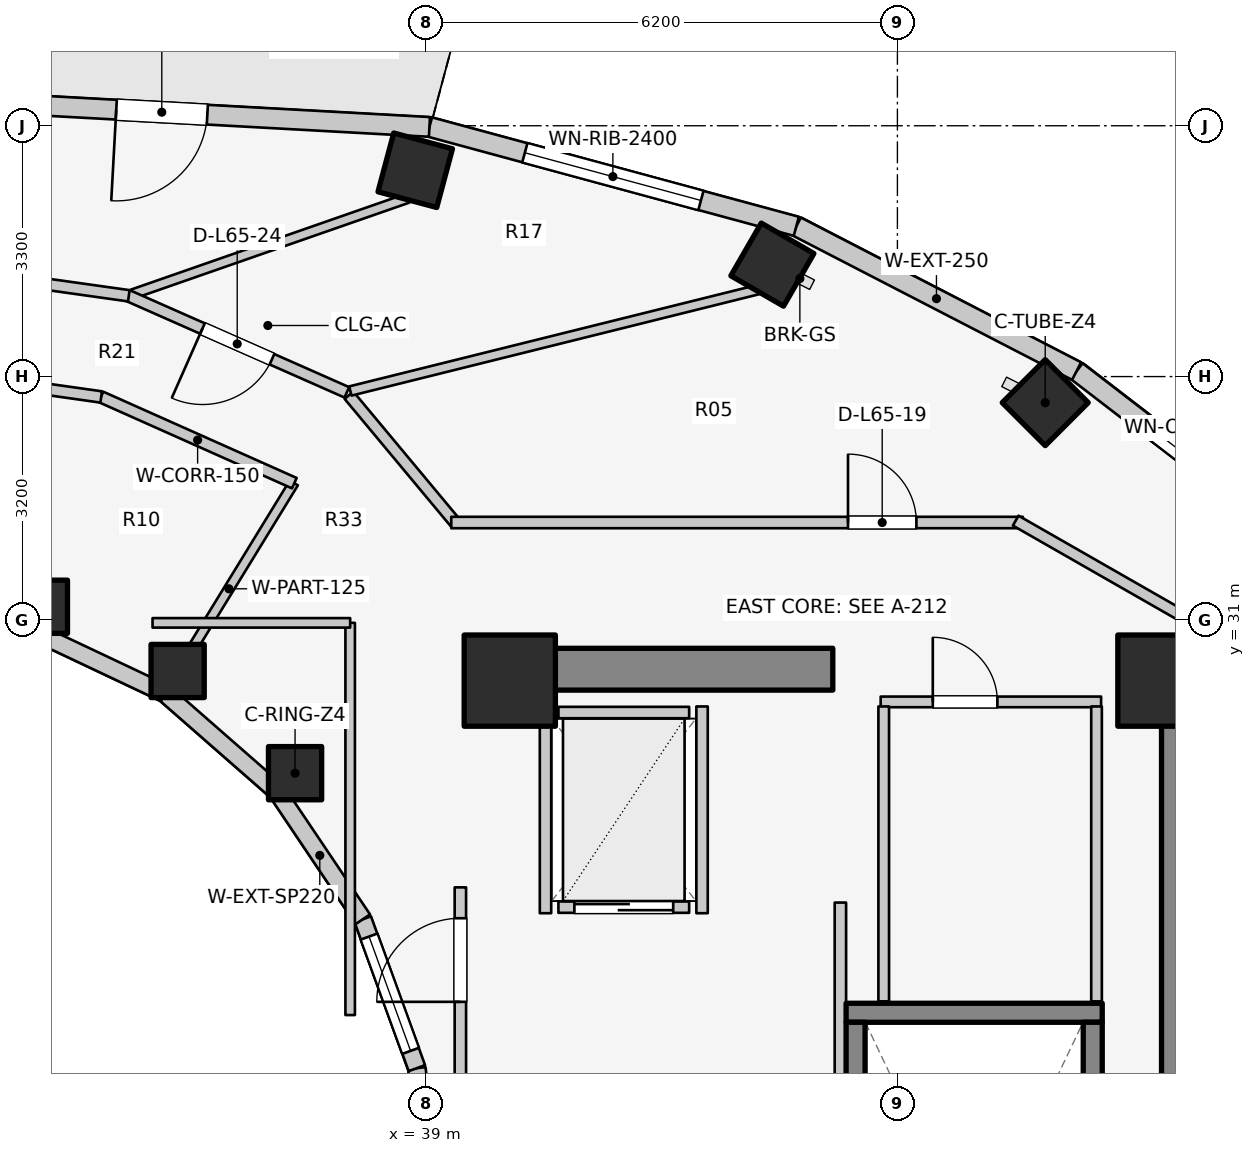
"""IFC4 building model, lengths in metres.
Left out: names, types, materials, properties, quantities, classifications, styles, units other than length and angle.
Written with IfcOpenShell. Run it as: python <this file> out.ifc"""

import sys

from ifc_helpers import new_model, si_unit, direction, frame, frame_2d, origin, origin_2d, place, context, subcontext, project, spatial, rectangle, extrude, element, fill, save


model = new_model("IFC4")
c1 = context("Model", 3, precision=1e-05, world=origin(), true_north=direction((0.0, 1.0)))
c2 = subcontext(c1, "Body", "Model", "MODEL_VIEW")
j1 = project(units=[si_unit("LENGTHUNIT", "METRE"), si_unit("PLANEANGLEUNIT", "RADIAN")], contexts=[c1])
p1 = place(None, origin())
s1 = spatial("IfcSite", under=j1, at=p1, CompositionType="ELEMENT")
p2 = place(p1, origin())
s2 = spatial("IfcBuilding", under=s1, at=p2, CompositionType="ELEMENT")
p3 = place(p2, frame((0.0, 0.0, 214.0)))
s3 = spatial("IfcBuildingStorey", under=s2, at=p3, CompositionType="ELEMENT", Elevation=214.0)
p4 = place(p3, frame((48.95, 17.05, 0.0), z_axis=(0.0, 0.0, 1.0), x_axis=(0.0, 1.0, 0.0)))
e1 = element("IfcWall", 1, at=p4, inside=s3, PredefinedType="SHEAR", context=c2, shape_type="SweptSolid", body=[
    extrude(rectangle(XDim=12.8, YDim=0.55, at=frame_2d((6.4, 0.0))), origin(), (0.0, 0.0, 1.0), 3.1),
])
p5 = place(p3, frame((39.85, 30.35, 0.0), z_axis=(0.0, 0.0, 1.0), x_axis=(1.0, 0.0, 0.0)))
e2 = element("IfcWall", 2, at=p5, inside=s3, PredefinedType="SHEAR", context=c2, shape_type="SweptSolid", body=[
    extrude(rectangle(XDim=4.5, YDim=0.55, at=frame_2d((2.25, 0.0))), origin(), (0.0, 0.0, 1.0), 3.1),
])
p6 = place(p3, frame((44.525, 25.83, 0.0), z_axis=(0.0, 0.0, 1.0), x_axis=(1.0, 0.0, 0.0)))
e3 = element("IfcWall", 3, at=p6, inside=s3, PredefinedType="SOLIDWALL", context=c2, shape_type="SweptSolid", body=[
    extrude(rectangle(XDim=3.37, YDim=0.25, at=frame_2d((1.685, 0.0))), origin(), (0.0, 0.0, 1.0), 3.1),
])
for number, where, z_axis, x_axis in (
    (4, (44.65, 17.895, 0.0), (0.0, 0.0, 1.0), (0.0, 1.0, 0.0)),
    (5, (47.77, 17.895, 0.0), (0.0, 0.0, 1.0), (0.0, 1.0, 0.0)),
):
    element("IfcWall", number, at=place(p3, frame(where, z_axis=z_axis, x_axis=x_axis)), inside=s3, PredefinedType="SOLIDWALL", context=c2, shape_type="SweptSolid", body=[
        extrude(rectangle(XDim=7.81, YDim=0.25, at=frame_2d((3.905, 0.0))), origin(), (0.0, 0.0, 1.0), 3.1),
    ])
for number, where, z_axis, x_axis in (
    (6, (48.7, 30.2, 0.0), (0.0, 0.0, 1.0), (1.0, 0.0, 0.0)),
    (7, (40.1, 30.2, 0.0), (0.0, 0.0, 1.0), (1.0, 0.0, 0.0)),
):
    element("IfcColumn", number, at=place(p3, frame(where, z_axis=z_axis, x_axis=x_axis)), inside=s3, PredefinedType="COLUMN", context=c2, shape_type="SweptSolid", body=[
        extrude(rectangle(XDim=1.2, YDim=1.2, at=origin_2d()), origin(), (0.0, 0.0, 1.0), 3.1),
    ])
p7 = place(p3, frame((37.275, 28.982, 0.0), z_axis=(0.0, 0.0, 1.0), x_axis=(1.0, 0.0, 0.0)))
e8 = element("IfcColumn", 8, at=p7, inside=s3, PredefinedType="COLUMN", context=c2, shape_type="SweptSolid", body=[
    extrude(rectangle(XDim=0.7, YDim=0.7, at=origin_2d()), origin(), (0.0, 0.0, 1.0), 3.1),
])
p8 = place(p3, frame((47.145, 33.857, 0.0), z_axis=(0.0, 0.0, 1.0), x_axis=(0.707106781187, 0.707106781187, 0.0)))
e9 = element("IfcColumn", 9, at=p8, inside=s3, PredefinedType="COLUMN", context=c2, shape_type="SweptSolid", body=[
    extrude(rectangle(XDim=0.8, YDim=0.8, at=origin_2d()), origin(), (0.0, 0.0, 1.0), 3.1),
])
p9 = place(p3, frame((35.73, 30.327, 0.0), z_axis=(0.0, 0.0, 1.0), x_axis=(1.0, 0.0, 0.0)))
e10 = element("IfcColumn", 10, at=p9, inside=s3, PredefinedType="COLUMN", context=c2, shape_type="SweptSolid", body=[
    extrude(rectangle(XDim=0.7, YDim=0.7, at=origin_2d()), origin(), (0.0, 0.0, 1.0), 3.1),
])
p10 = place(p3, frame((43.555, 35.673, 0.0), z_axis=(0.0, 0.0, 1.0), x_axis=(0.5, 0.866025403784, 0.0)))
e11 = element("IfcColumn", 11, at=p10, inside=s3, PredefinedType="COLUMN", context=c2, shape_type="SweptSolid", body=[
    extrude(rectangle(XDim=0.8, YDim=0.8, at=origin_2d()), origin(), (0.0, 0.0, 1.0), 3.1),
])
p11 = place(p3, frame((33.931, 31.172, 0.0), z_axis=(0.0, 0.0, 1.0), x_axis=(1.0, 0.0, 0.0)))
e12 = element("IfcColumn", 12, at=p11, inside=s3, PredefinedType="COLUMN", context=c2, shape_type="SweptSolid", body=[
    extrude(rectangle(XDim=0.7, YDim=0.7, at=origin_2d()), origin(), (0.0, 0.0, 1.0), 3.1),
])
p12 = place(p3, frame((38.856, 36.914, 0.0), z_axis=(0.0, 0.0, 1.0), x_axis=(0.258819045103, 0.965925826289, 0.0)))
e13 = element("IfcColumn", 13, at=p12, inside=s3, PredefinedType="COLUMN", context=c2, shape_type="SweptSolid", body=[
    extrude(rectangle(XDim=0.8, YDim=0.8, at=origin_2d()), origin(), (0.0, 0.0, 1.0), 3.1),
])
p13 = place(p3, frame((39.12, 23.0, 0.0), z_axis=(0.0, 0.0, 1.0), x_axis=(-0.114711713601, 0.993398823617, 0.0)))
e14 = element("IfcWall", 14, at=p13, inside=s3, PredefinedType="STANDARD", context=c2, shape_type="SweptSolid", body=[
    extrude(rectangle(XDim=2.115, YDim=0.23, at=frame_2d((1.058, 0.0))), origin(), (0.0, 0.0, 1.0), 2.84),
])
p14 = place(p3, frame((38.877, 25.102, 0.0), z_axis=(0.0, 0.0, 1.0), x_axis=(-0.341423187295, 0.93990968033, 0.0)))
e15 = element("IfcWall", 15, at=p14, inside=s3, PredefinedType="STANDARD", context=c2, shape_type="SweptSolid", body=[
    extrude(rectangle(XDim=2.084, YDim=0.23, at=frame_2d((1.042, 0.0))), origin(), (0.0, 0.0, 1.0), 2.84),
])
p15 = place(p14, frame((0.242, 0.0, 0.85)))
e16 = element("IfcOpeningElement", 16, at=p15, cuts=e15, PredefinedType="OPENING", context=c2, shape_type="SweptSolid", body=[
    extrude(rectangle(XDim=1.6, YDim=1.65, at=frame_2d((0.8, 0.825))), frame((0.0, 0.125, 0.0), z_axis=(0.0, -1.0, 0.0), x_axis=(1.0, 0.0, 0.0)), (0.0, 0.0, 1.0), 0.25),
])
p16 = place(p3, frame((38.166, 27.06, 0.0), z_axis=(0.0, 0.0, 1.0), x_axis=(-0.558197800898, 0.829707909492, 0.0)))
e17 = element("IfcWall", 17, at=p16, inside=s3, PredefinedType="STANDARD", context=c2, shape_type="SweptSolid", body=[
    extrude(rectangle(XDim=2.027, YDim=0.23, at=frame_2d((1.013, 0.0))), origin(), (0.0, 0.0, 1.0), 2.16),
])
p17 = place(p3, frame((37.035, 28.742, 0.0), z_axis=(0.0, 0.0, 1.0), x_axis=(-0.752576694707, 0.658504607869, 0.0)))
e18 = element("IfcWall", 18, at=p17, inside=s3, PredefinedType="STANDARD", context=c2, shape_type="SweptSolid", body=[
    extrude(rectangle(XDim=1.959, YDim=0.23, at=frame_2d((0.98, 0.0))), origin(), (0.0, 0.0, 1.0), 2.16),
])
p18 = place(p3, frame((35.56, 30.032, 0.0), z_axis=(0.0, 0.0, 1.0), x_axis=(-0.904179699603, 0.427152280606, 0.0)))
e19 = element("IfcWall", 19, at=p18, inside=s3, PredefinedType="STANDARD", context=c2, shape_type="SweptSolid", body=[
    extrude(rectangle(XDim=1.899, YDim=0.23, at=frame_2d((0.95, 0.0))), origin(), (0.0, 0.0, 1.0), 2.16),
])
p19 = place(p3, frame((50.761, 31.809, 0.0), z_axis=(0.0, 0.0, 1.0), x_axis=(-0.792713817907, 0.609593965603, 0.0)))
e20 = element("IfcWall", 20, at=p19, inside=s3, PredefinedType="STANDARD", context=c2, shape_type="SweptSolid", body=[
    extrude(rectangle(XDim=4.041, YDim=0.26, at=frame_2d((2.021, 0.0))), origin(), (0.0, 0.0, 1.0), 2.85),
])
p20 = place(p19, frame((1.271, 0.0, 0.75)))
e21 = element("IfcOpeningElement", 21, at=p20, cuts=e20, PredefinedType="OPENING", context=c2, shape_type="SweptSolid", body=[
    extrude(rectangle(XDim=1.5, YDim=1.6, at=frame_2d((0.75, 0.8))), frame((0.0, 0.14, 0.0), z_axis=(0.0, -1.0, 0.0), x_axis=(1.0, 0.0, 0.0)), (0.0, 0.0, 1.0), 0.28),
])
p21 = place(p3, frame((47.558, 34.272, 0.0), z_axis=(0.0, 0.0, 1.0), x_axis=(-0.88849146803, 0.458893137057, 0.0)))
e22 = element("IfcWall", 22, at=p21, inside=s3, PredefinedType="STANDARD", context=c2, shape_type="SweptSolid", body=[
    extrude(rectangle(XDim=4.15, YDim=0.26, at=frame_2d((2.075, 0.0))), origin(), (0.0, 0.0, 1.0), 2.85),
])
p22 = place(p3, frame((43.87, 36.177, 0.0), z_axis=(0.0, 0.0, 1.0), x_axis=(-0.965213026382, 0.261464746576, 0.0)))
e23 = element("IfcWall", 23, at=p22, inside=s3, PredefinedType="STANDARD", context=c2, shape_type="SweptSolid", body=[
    extrude(rectangle(XDim=5.001, YDim=0.26, at=frame_2d((2.5, 0.0))), origin(), (0.0, 0.0, 1.0), 2.85),
])
p23 = place(p22, frame((1.301, 0.0, 0.75)))
e24 = element("IfcOpeningElement", 24, at=p23, cuts=e23, PredefinedType="OPENING", context=c2, shape_type="SweptSolid", body=[
    extrude(rectangle(XDim=2.4, YDim=1.7, at=frame_2d((1.2, 0.85))), frame((0.0, 0.14, 0.0), z_axis=(0.0, -1.0, 0.0), x_axis=(1.0, 0.0, 0.0)), (0.0, 0.0, 1.0), 0.28),
])
p24 = place(p3, frame((39.043, 37.485, 0.0), z_axis=(0.0, 0.0, 1.0), x_axis=(-0.998490239527, 0.054929423535, 0.0)))
e25 = element("IfcWall", 25, at=p24, inside=s3, PredefinedType="STANDARD", context=c2, shape_type="SweptSolid", body=[
    extrude(rectangle(XDim=7.054, YDim=0.26, at=frame_2d((3.527, 0.0))), origin(), (0.0, 0.0, 1.0), 2.88),
])
p25 = place(p24, frame((2.927, 0.0, 0.0)))
e26 = element("IfcOpeningElement", 26, at=p25, cuts=e25, PredefinedType="OPENING", context=c2, shape_type="SweptSolid", body=[
    extrude(rectangle(XDim=1.2, YDim=2.2, at=frame_2d((0.6, 1.1))), frame((0.0, 0.14, 0.0), z_axis=(0.0, -1.0, 0.0), x_axis=(1.0, 0.0, 0.0)), (0.0, 0.0, 1.0), 0.28),
])
p26 = place(p3, frame((40.74, 27.22, 0.0), z_axis=(0.0, 0.0, 1.0), x_axis=(1.0, 0.0, 0.0)))
e27 = element("IfcWall", 27, at=p26, inside=s3, PredefinedType="SOLIDWALL", context=c2, shape_type="SweptSolid", body=[
    extrude(rectangle(XDim=1.72, YDim=0.15, at=frame_2d((0.86, 0.0))), origin(), (0.0, 0.0, 1.0), 2.855),
])
p27 = place(p26, frame((0.21, 0.0, 0.0)))
e28 = element("IfcOpeningElement", 28, at=p27, cuts=e27, PredefinedType="OPENING", context=c2, shape_type="SweptSolid", body=[
    extrude(rectangle(XDim=1.3, YDim=2.1, at=frame_2d((0.65, 1.05))), frame((0.0, 0.085, 0.0), z_axis=(0.0, -1.0, 0.0), x_axis=(1.0, 0.0, 0.0)), (0.0, 0.0, 1.0), 0.17),
])
p28 = place(p3, frame((40.74, 29.78, 0.0), z_axis=(0.0, 0.0, 1.0), x_axis=(1.0, 0.0, 0.0)))
e29 = element("IfcWall", 29, at=p28, inside=s3, PredefinedType="SOLIDWALL", context=c2, shape_type="SweptSolid", body=[
    extrude(rectangle(XDim=1.72, YDim=0.15, at=frame_2d((0.86, 0.0))), origin(), (0.0, 0.0, 1.0), 2.855),
])
for number, where, z_axis, x_axis in (
    (30, (40.57, 27.14, 0.0), (0.0, 0.0, 1.0), (0.0, 1.0, 0.0)),
    (31, (42.63, 27.14, 0.0), (0.0, 0.0, 1.0), (0.0, 1.0, 0.0)),
):
    element("IfcWall", number, at=place(p3, frame(where, z_axis=z_axis, x_axis=x_axis)), inside=s3, PredefinedType="SOLIDWALL", context=c2, shape_type="SweptSolid", body=[
        extrude(rectangle(XDim=2.72, YDim=0.15, at=frame_2d((1.36, 0.0))), origin(), (0.0, 0.0, 1.0), 2.855),
    ])
p29 = place(p3, frame((44.45, 24.08, 0.0), z_axis=(0.0, 0.0, 1.0), x_axis=(0.0, 1.0, 0.0)))
e32 = element("IfcWall", 32, at=p29, inside=s3, PredefinedType="PARTITIONING", context=c2, shape_type="SweptSolid", body=[
    extrude(rectangle(XDim=3.2, YDim=0.15, at=frame_2d((1.6, 0.0))), origin(), (0.0, 0.0, 1.0), 2.855),
])
p30 = place(p3, frame((39.45, 24.08, 0.0), z_axis=(0.0, 0.0, 1.0), x_axis=(0.0, 1.0, 0.0)))
e33 = element("IfcWall", 33, at=p30, inside=s3, PredefinedType="PARTITIONING", context=c2, shape_type="SweptSolid", body=[
    extrude(rectangle(XDim=3.4, YDim=0.15, at=frame_2d((1.7, 0.0))), origin(), (0.0, 0.0, 1.0), 2.855),
])
p31 = place(p30, frame((1.894, 0.0, 0.0)))
e34 = element("IfcOpeningElement", 34, at=p31, cuts=e33, PredefinedType="OPENING", context=c2, shape_type="SweptSolid", body=[
    extrude(rectangle(XDim=1.1, YDim=2.1, at=frame_2d((0.55, 1.05))), frame((0.0, 0.085, 0.0), z_axis=(0.0, -1.0, 0.0), x_axis=(1.0, 0.0, 0.0)), (0.0, 0.0, 1.0), 0.17),
])
p32 = place(p3, frame((44.98, 29.92, 0.0), z_axis=(0.0, 0.0, 1.0), x_axis=(1.0, 0.0, 0.0)))
e35 = element("IfcWall", 35, at=p32, inside=s3, PredefinedType="PLUMBINGWALL", context=c2, shape_type="SweptSolid", body=[
    extrude(rectangle(XDim=2.9, YDim=0.14, at=frame_2d((1.45, 0.0))), origin(), (0.0, 0.0, 1.0), 2.855),
])
p33 = place(p32, frame((0.686, 0.0, 0.0)))
e36 = element("IfcOpeningElement", 36, at=p33, cuts=e35, PredefinedType="OPENING", context=c2, shape_type="SweptSolid", body=[
    extrude(rectangle(XDim=0.85, YDim=2.05, at=frame_2d((0.425, 1.025))), frame((0.0, 0.08, 0.0), z_axis=(0.0, -1.0, 0.0), x_axis=(1.0, 0.0, 0.0)), (0.0, 0.0, 1.0), 0.16),
])
for number, where, z_axis, x_axis in (
    (37, (45.02, 25.98, 0.0), (0.0, 0.0, 1.0), (0.0, 1.0, 0.0)),
    (38, (47.82, 25.98, 0.0), (0.0, 0.0, 1.0), (0.0, 1.0, 0.0)),
):
    element("IfcWall", number, at=place(p3, frame(where, z_axis=z_axis, x_axis=x_axis)), inside=s3, PredefinedType="PLUMBINGWALL", context=c2, shape_type="SweptSolid", body=[
        extrude(rectangle(XDim=3.88, YDim=0.14, at=frame_2d((1.94, 0.0))), origin(), (0.0, 0.0, 1.0), 2.855),
    ])
p34 = place(p3, frame((35.55, 30.015, 0.0), z_axis=(0.0, 0.0, 1.0), x_axis=(0.522763432117, 0.852477796802, 0.0)))
e39 = element("IfcWall", 39, at=p34, inside=s3, PredefinedType="PARTITIONING", context=c2, shape_type="SweptSolid", body=[
    extrude(rectangle(XDim=3.269, YDim=0.125, at=frame_2d((1.635, 0.0))), origin(), (0.0, 0.0, 1.0), 2.376),
])
p35 = place(p3, frame((37.265, 32.798, 0.0), z_axis=(0.0, 0.0, 1.0), x_axis=(-0.913254317828, 0.407389924971, 0.0)))
e40 = element("IfcWall", 40, at=p35, inside=s3, PredefinedType="PARTITIONING", context=c2, shape_type="SweptSolid", body=[
    extrude(rectangle(XDim=2.787, YDim=0.15, at=frame_2d((1.393, 0.0))), origin(), (0.0, 0.0, 1.0), 2.376),
])
p36 = place(p3, frame((34.724, 33.932, 0.0), z_axis=(0.0, 0.0, 1.0), x_axis=(-0.990150268487, 0.140008734782, 0.0)))
e41 = element("IfcWall", 41, at=p36, inside=s3, PredefinedType="PARTITIONING", context=c2, shape_type="SweptSolid", body=[
    extrude(rectangle(XDim=2.759, YDim=0.15, at=frame_2d((1.379, 0.0))), origin(), (0.0, 0.0, 1.0), 2.376),
])
p37 = place(p36, frame((0.904, 0.0, 0.0)))
e42 = element("IfcOpeningElement", 42, at=p37, cuts=e41, PredefinedType="OPENING", context=c2, shape_type="SweptSolid", body=[
    extrude(rectangle(XDim=0.95, YDim=2.1, at=frame_2d((0.475, 1.05))), frame((0.0, 0.085, 0.0), z_axis=(0.0, -1.0, 0.0), x_axis=(1.0, 0.0, 0.0)), (0.0, 0.0, 1.0), 0.17),
])
p38 = place(p3, frame((38.0, 25.8, 0.0), z_axis=(0.0, 0.0, 1.0), x_axis=(0.0, 1.0, 0.0)))
e43 = element("IfcWall", 43, at=p38, inside=s3, PredefinedType="PARTITIONING", context=c2, shape_type="SweptSolid", body=[
    extrude(rectangle(XDim=5.16, YDim=0.125, at=frame_2d((2.58, 0.0))), origin(), (0.0, 0.0, 1.0), 2.232),
])
p39 = place(p3, frame((35.4, 30.96, 0.0), z_axis=(0.0, 0.0, 1.0), x_axis=(1.0, 0.0, 0.0)))
e44 = element("IfcWall", 44, at=p39, inside=s3, PredefinedType="PARTITIONING", context=c2, shape_type="SweptSolid", body=[
    extrude(rectangle(XDim=2.6, YDim=0.125, at=frame_2d((1.3, 0.0))), origin(), (0.0, 0.0, 1.0), 2.376),
])
p40 = place(p3, frame((37.984, 33.955, 0.0), z_axis=(0.0, 0.0, 1.0), x_axis=(0.64030392053, -0.76812166312, 0.0)))
e45 = element("IfcWall", 45, at=p40, inside=s3, PredefinedType="PARTITIONING", context=c2, shape_type="SweptSolid", body=[
    extrude(rectangle(XDim=2.21, YDim=0.15, at=frame_2d((1.105, 0.0))), origin(), (0.0, 0.0, 1.0), 2.376),
])
p41 = place(p3, frame((39.33, 32.28, 0.0), z_axis=(0.0, 0.0, 1.0), x_axis=(1.0, 0.0, 0.0)))
e46 = element("IfcWall", 46, at=p41, inside=s3, PredefinedType="PARTITIONING", context=c2, shape_type="SweptSolid", body=[
    extrude(rectangle(XDim=7.52, YDim=0.15, at=frame_2d((3.76, 0.0))), origin(), (0.0, 0.0, 1.0), 2.376),
])
p42 = place(p41, frame((5.22, 0.0, 0.0)))
e47 = element("IfcOpeningElement", 47, at=p42, cuts=e46, PredefinedType="OPENING", context=c2, shape_type="SweptSolid", body=[
    extrude(rectangle(XDim=0.9, YDim=2.1, at=frame_2d((0.45, 1.05))), frame((0.0, 0.085, 0.0), z_axis=(0.0, -1.0, 0.0), x_axis=(1.0, 0.0, 0.0)), (0.0, 0.0, 1.0), 0.17),
])
p43 = place(p3, frame((46.757, 32.305, 0.0), z_axis=(0.0, 0.0, 1.0), x_axis=(0.867991349648, -0.496579315857, 0.0)))
e48 = element("IfcWall", 48, at=p43, inside=s3, PredefinedType="PARTITIONING", context=c2, shape_type="SweptSolid", body=[
    extrude(rectangle(XDim=2.567, YDim=0.15, at=frame_2d((1.283, 0.0))), origin(), (0.0, 0.0, 1.0), 2.22),
])
p44 = place(p3, frame((38.002, 34.01, 0.0), z_axis=(0.0, 0.0, 1.0), x_axis=(0.970445810114, 0.241319144769, 0.0)))
e49 = element("IfcWall", 49, at=p44, inside=s3, PredefinedType="PARTITIONING", context=c2, shape_type="SweptSolid", body=[
    extrude(rectangle(XDim=5.526, YDim=0.125, at=frame_2d((2.763, 0.0))), origin(), (0.0, 0.0, 1.0), 2.376),
])
p45 = place(p3, frame((35.131, 35.283, 0.0), z_axis=(0.0, 0.0, 1.0), x_axis=(0.944311395416, 0.329053169697, 0.0)))
e50 = element("IfcWall", 50, at=p45, inside=s3, PredefinedType="PARTITIONING", context=c2, shape_type="SweptSolid", body=[
    extrude(rectangle(XDim=3.84, YDim=0.125, at=frame_2d((1.92, 0.0))), origin(), (0.0, 0.0, 1.0), 2.376),
])
p46 = place(p3, frame((37.956, 33.992, 0.0), z_axis=(0.0, 0.0, 1.0), x_axis=(-0.914642679993, 0.404263240891, 0.0)))
e51 = element("IfcWall", 51, at=p46, inside=s3, PredefinedType="PARTITIONING", context=c2, shape_type="SweptSolid", body=[
    extrude(rectangle(XDim=3.154, YDim=0.15, at=frame_2d((1.577, 0.0))), origin(), (0.0, 0.0, 1.0), 2.376),
])
p47 = place(p46, frame((1.077, 0.0, 0.0)))
e52 = element("IfcOpeningElement", 52, at=p47, cuts=e51, PredefinedType="OPENING", context=c2, shape_type="SweptSolid", body=[
    extrude(rectangle(XDim=1.0, YDim=2.1, at=frame_2d((0.5, 1.05))), frame((0.0, 0.085, 0.0), z_axis=(0.0, -1.0, 0.0), x_axis=(1.0, 0.0, 0.0)), (0.0, 0.0, 1.0), 0.17),
])
p48 = place(p3, frame((35.087, 35.263, 0.0), z_axis=(0.0, 0.0, 1.0), x_axis=(-0.990268690673, 0.139168675614, 0.0)))
e53 = element("IfcWall", 53, at=p48, inside=s3, PredefinedType="PARTITIONING", context=c2, shape_type="SweptSolid", body=[
    extrude(rectangle(XDim=3.126, YDim=0.15, at=frame_2d((1.563, 0.0))), origin(), (0.0, 0.0, 1.0), 2.376),
])
p49 = place(p15, origin())
e54 = element("IfcWindow", 54, at=p49, inside=s3, PartitioningType="SINGLE_PANEL", PredefinedType="WINDOW", context=c2, shape_type="SweptSolid", body=[
    extrude(rectangle(XDim=1.6, YDim=1.65, at=frame_2d((0.8, 0.825))), frame((0.0, 0.03, 0.0), z_axis=(0.0, -1.0, 0.0), x_axis=(1.0, 0.0, 0.0)), (0.0, 0.0, 1.0), 0.06),
])
fill(e16, e54)
p50 = place(p20, origin())
e55 = element("IfcWindow", 55, at=p50, inside=s3, PartitioningType="SINGLE_PANEL", PredefinedType="WINDOW", context=c2, shape_type="SweptSolid", body=[
    extrude(rectangle(XDim=1.5, YDim=1.6, at=frame_2d((0.75, 0.8))), frame((0.0, 0.03, 0.0), z_axis=(0.0, -1.0, 0.0), x_axis=(1.0, 0.0, 0.0)), (0.0, 0.0, 1.0), 0.06),
])
fill(e21, e55)
p51 = place(p23, origin())
e56 = element("IfcWindow", 56, at=p51, inside=s3, PartitioningType="SINGLE_PANEL", PredefinedType="WINDOW", context=c2, shape_type="SweptSolid", body=[
    extrude(rectangle(XDim=2.4, YDim=1.7, at=frame_2d((1.2, 0.85))), frame((0.0, 0.03, 0.0), z_axis=(0.0, -1.0, 0.0), x_axis=(1.0, 0.0, 0.0)), (0.0, 0.0, 1.0), 0.06),
])
fill(e24, e56)
p52 = place(p25, origin())
e57 = element("IfcDoor", 57, at=p52, inside=s3, OperationType="SINGLE_SWING_RIGHT", PredefinedType="DOOR", context=c2, shape_type="SweptSolid", body=[
    extrude(rectangle(XDim=1.2, YDim=2.2, at=frame_2d((0.6, 1.1))), frame((0.0, 0.025, 0.0), z_axis=(0.0, -1.0, 0.0), x_axis=(1.0, 0.0, 0.0)), (0.0, 0.0, 1.0), 0.05),
])
fill(e26, e57)
p53 = place(p27, origin())
e58 = element("IfcDoor", 58, at=p53, inside=s3, OperationType="DOUBLE_DOOR_SLIDING", PredefinedType="DOOR", context=c2, shape_type="SweptSolid", body=[
    extrude(rectangle(XDim=1.3, YDim=2.1, at=frame_2d((0.65, 1.05))), frame((0.0, 0.025, 0.0), z_axis=(0.0, -1.0, 0.0), x_axis=(1.0, 0.0, 0.0)), (0.0, 0.0, 1.0), 0.05),
])
fill(e28, e58)
p54 = place(p31, origin())
e59 = element("IfcDoor", 59, at=p54, inside=s3, OperationType="SINGLE_SWING_LEFT", PredefinedType="DOOR", context=c2, shape_type="SweptSolid", body=[
    extrude(rectangle(XDim=1.1, YDim=2.1, at=frame_2d((0.55, 1.05))), frame((0.0, 0.025, 0.0), z_axis=(0.0, -1.0, 0.0), x_axis=(1.0, 0.0, 0.0)), (0.0, 0.0, 1.0), 0.05),
])
fill(e34, e59)
p55 = place(p33, origin())
e60 = element("IfcDoor", 60, at=p55, inside=s3, OperationType="SINGLE_SWING_LEFT", PredefinedType="DOOR", context=c2, shape_type="SweptSolid", body=[
    extrude(rectangle(XDim=0.85, YDim=2.05, at=frame_2d((0.425, 1.025))), frame((0.0, 0.025, 0.0), z_axis=(0.0, -1.0, 0.0), x_axis=(1.0, 0.0, 0.0)), (0.0, 0.0, 1.0), 0.05),
])
fill(e36, e60)
p56 = place(p42, origin())
e61 = element("IfcDoor", 61, at=p56, inside=s3, OperationType="SINGLE_SWING_LEFT", PredefinedType="DOOR", context=c2, shape_type="SweptSolid", body=[
    extrude(rectangle(XDim=0.9, YDim=2.1, at=frame_2d((0.45, 1.05))), frame((0.0, 0.025, 0.0), z_axis=(0.0, -1.0, 0.0), x_axis=(1.0, 0.0, 0.0)), (0.0, 0.0, 1.0), 0.05),
])
fill(e47, e61)
p57 = place(p47, origin())
e62 = element("IfcDoor", 62, at=p57, inside=s3, OperationType="SINGLE_SWING_RIGHT", PredefinedType="DOOR", context=c2, shape_type="SweptSolid", body=[
    extrude(rectangle(XDim=1.0, YDim=2.1, at=frame_2d((0.5, 1.05))), frame((0.0, 0.025, 0.0), z_axis=(0.0, -1.0, 0.0), x_axis=(1.0, 0.0, 0.0)), (0.0, 0.0, 1.0), 0.05),
])
fill(e52, e62)
save(model, sys.argv[1])
